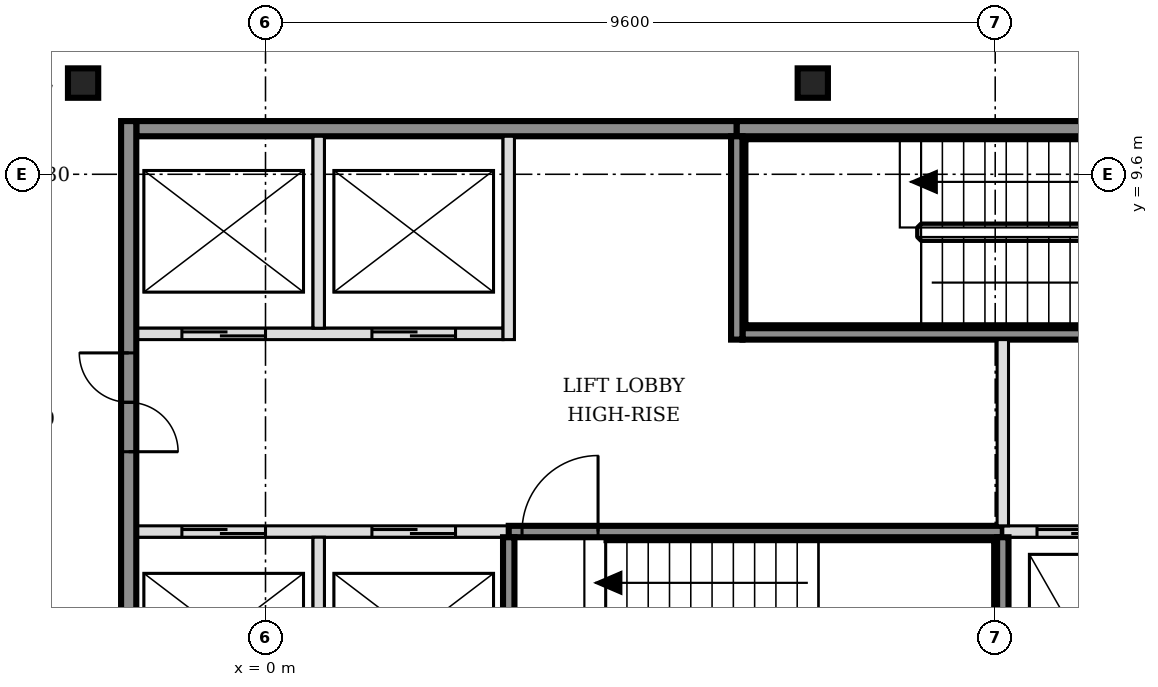
"""IFC4 building model, lengths in metres.
Left out: names, types, materials, properties, quantities, classifications, styles, units other than length and angle.
Written with IfcOpenShell. Run it as: python <this file> out.ifc"""

import sys

from ifc_helpers import new_model, si_unit, direction, frame, frame_2d, origin, origin_2d, place, context, subcontext, project, spatial, rectangle, i_section, extrude, element, fill, save


model = new_model("IFC4")
c1 = context("Model", 3, precision=1e-05, world=origin(), true_north=direction((0.0, 1.0)))
c2 = subcontext(c1, "Body", "Model", "MODEL_VIEW")
j1 = project(units=[si_unit("LENGTHUNIT", "METRE"), si_unit("PLANEANGLEUNIT", "RADIAN")], contexts=[c1])
p1 = place(None, origin())
s1 = spatial("IfcSite", under=j1, at=p1, CompositionType="ELEMENT")
p2 = place(p1, origin())
s2 = spatial("IfcBuilding", under=s1, at=p2, CompositionType="ELEMENT")
p3 = place(p2, frame((0.0, 0.0, 267.0)))
s3 = spatial("IfcBuildingStorey", under=s2, at=p3, CompositionType="ELEMENT", Elevation=267.0)
for number, where, z_axis, x_axis in (
    (1, (-2.4, 10.8, -0.15), (0.0, 0.0, 1.0), (1.0, 0.0, 0.0)),
    (2, (7.2, 10.8, -0.15), (0.0, 0.0, 1.0), (1.0, 0.0, 0.0)),
):
    element("IfcColumn", number, at=place(p3, frame(where, z_axis=z_axis, x_axis=x_axis)), inside=s3, PredefinedType="COLUMN", context=c2, shape_type="SweptSolid", body=[
        extrude(i_section(OverallWidth=0.398, OverallDepth=0.387, WebThickness=0.021, FlangeThickness=0.033, FilletRadius=0.015, at=origin_2d()), origin(), (0.0, 0.0, 1.0), 3.6),
    ])
p4 = place(p3, frame((-1.7, 4.9, 0.0), z_axis=(0.0, 0.0, 1.0), x_axis=(1.0, 0.0, 0.0)))
e3 = element("IfcWall", 3, at=p4, inside=s3, PredefinedType="SOLIDWALL", context=c2, shape_type="SweptSolid", body=[
    extrude(rectangle(XDim=4.9, YDim=0.15, at=frame_2d((2.45, 0.0))), origin(), (0.0, 0.0, 1.0), 3.45),
])
p5 = place(p4, frame((0.6, 0.0, 0.0)))
e4 = element("IfcOpeningElement", 4, at=p5, cuts=e3, PredefinedType="OPENING", context=c2, shape_type="SweptSolid", body=[
    extrude(rectangle(XDim=1.1, YDim=2.1, at=frame_2d((0.55, 1.05))), frame((0.0, 0.085, 0.0), z_axis=(0.0, -1.0, 0.0), x_axis=(1.0, 0.0, 0.0)), (0.0, 0.0, 1.0), 0.17),
])
p6 = place(p4, frame((3.1, 0.0, 0.0)))
e5 = element("IfcOpeningElement", 5, at=p6, cuts=e3, PredefinedType="OPENING", context=c2, shape_type="SweptSolid", body=[
    extrude(rectangle(XDim=1.1, YDim=2.1, at=frame_2d((0.55, 1.05))), frame((0.0, 0.085, 0.0), z_axis=(0.0, -1.0, 0.0), x_axis=(1.0, 0.0, 0.0)), (0.0, 0.0, 1.0), 0.17),
])
p7 = place(p3, frame((3.2, 4.9, 0.0), z_axis=(0.0, 0.0, 1.0), x_axis=(1.0, 0.0, 0.0)))
e6 = element("IfcWall", 6, at=p7, inside=s3, PredefinedType="SOLIDWALL", context=c2, shape_type="SweptSolid", body=[
    extrude(rectangle(XDim=6.5, YDim=0.15, at=frame_2d((3.25, 0.0))), origin(), (0.0, 0.0, 1.0), 3.45),
])
p8 = place(p7, frame((0.175, 0.0, 0.0)))
e7 = element("IfcOpeningElement", 7, at=p8, cuts=e6, PredefinedType="OPENING", context=c2, shape_type="SweptSolid", body=[
    extrude(rectangle(XDim=1.0, YDim=2.1, at=frame_2d((0.5, 1.05))), frame((0.0, 0.085, 0.0), z_axis=(0.0, -1.0, 0.0), x_axis=(1.0, 0.0, 0.0)), (0.0, 0.0, 1.0), 0.17),
])
p9 = place(p3, frame((9.7, 4.9, 0.0), z_axis=(0.0, 0.0, 1.0), x_axis=(1.0, 0.0, 0.0)))
e8 = element("IfcWall", 8, at=p9, inside=s3, PredefinedType="SOLIDWALL", context=c2, shape_type="SweptSolid", body=[
    extrude(rectangle(XDim=6.4, YDim=0.15, at=frame_2d((3.2, 0.0))), origin(), (0.0, 0.0, 1.0), 3.45),
])
p10 = place(p9, frame((0.45, 0.0, 0.0)))
e9 = element("IfcOpeningElement", 9, at=p10, cuts=e8, PredefinedType="OPENING", context=c2, shape_type="SweptSolid", body=[
    extrude(rectangle(XDim=1.0, YDim=2.1, at=frame_2d((0.5, 1.05))), frame((0.0, 0.085, 0.0), z_axis=(0.0, -1.0, 0.0), x_axis=(1.0, 0.0, 0.0)), (0.0, 0.0, 1.0), 0.17),
])
p11 = place(p9, frame((2.35, 0.0, 0.0)))
e10 = element("IfcOpeningElement", 10, at=p11, cuts=e8, PredefinedType="OPENING", context=c2, shape_type="SweptSolid", body=[
    extrude(rectangle(XDim=1.0, YDim=2.1, at=frame_2d((0.5, 1.05))), frame((0.0, 0.085, 0.0), z_axis=(0.0, -1.0, 0.0), x_axis=(1.0, 0.0, 0.0)), (0.0, 0.0, 1.0), 0.17),
])
p12 = place(p9, frame((4.7, 0.0, 0.0)))
e11 = element("IfcOpeningElement", 11, at=p12, cuts=e8, PredefinedType="OPENING", context=c2, shape_type="SweptSolid", body=[
    extrude(rectangle(XDim=0.9, YDim=2.1, at=frame_2d((0.45, 1.05))), frame((0.0, 0.085, 0.0), z_axis=(0.0, -1.0, 0.0), x_axis=(1.0, 0.0, 0.0)), (0.0, 0.0, 1.0), 0.17),
])
p13 = place(p3, frame((-1.7, 7.5, 0.0), z_axis=(0.0, 0.0, 1.0), x_axis=(1.0, 0.0, 0.0)))
e12 = element("IfcWall", 12, at=p13, inside=s3, PredefinedType="SOLIDWALL", context=c2, shape_type="SweptSolid", body=[
    extrude(rectangle(XDim=4.825, YDim=0.15, at=frame_2d((2.413, 0.0))), origin(), (0.0, 0.0, 1.0), 3.45),
])
p14 = place(p13, frame((0.6, 0.0, 0.0)))
e13 = element("IfcOpeningElement", 13, at=p14, cuts=e12, PredefinedType="OPENING", context=c2, shape_type="SweptSolid", body=[
    extrude(rectangle(XDim=1.1, YDim=2.1, at=frame_2d((0.55, 1.05))), frame((0.0, 0.085, 0.0), z_axis=(0.0, -1.0, 0.0), x_axis=(1.0, 0.0, 0.0)), (0.0, 0.0, 1.0), 0.17),
])
p15 = place(p13, frame((3.1, 0.0, 0.0)))
e14 = element("IfcOpeningElement", 14, at=p15, cuts=e12, PredefinedType="OPENING", context=c2, shape_type="SweptSolid", body=[
    extrude(rectangle(XDim=1.1, YDim=2.1, at=frame_2d((0.55, 1.05))), frame((0.0, 0.085, 0.0), z_axis=(0.0, -1.0, 0.0), x_axis=(1.0, 0.0, 0.0)), (0.0, 0.0, 1.0), 0.17),
])
p16 = place(p3, frame((6.275, 7.5, 0.0), z_axis=(0.0, 0.0, 1.0), x_axis=(1.0, 0.0, 0.0)))
e15 = element("IfcWall", 15, at=p16, inside=s3, PredefinedType="SOLIDWALL", context=c2, shape_type="SweptSolid", body=[
    extrude(rectangle(XDim=6.425, YDim=0.15, at=frame_2d((3.212, 0.0))), origin(), (0.0, 0.0, 1.0), 3.45),
])
p17 = place(p16, frame((5.225, 0.0, 0.0)))
e16 = element("IfcOpeningElement", 16, at=p17, cuts=e15, PredefinedType="OPENING", context=c2, shape_type="SweptSolid", body=[
    extrude(rectangle(XDim=1.0, YDim=2.1, at=frame_2d((0.5, 1.05))), frame((0.0, 0.085, 0.0), z_axis=(0.0, -1.0, 0.0), x_axis=(1.0, 0.0, 0.0)), (0.0, 0.0, 1.0), 0.17),
])
p18 = place(p3, frame((-1.7, 10.2, 0.0), z_axis=(0.0, 0.0, 1.0), x_axis=(1.0, 0.0, 0.0)))
e17 = element("IfcWall", 17, at=p18, inside=s3, PredefinedType="SOLIDWALL", context=c2, shape_type="SweptSolid", body=[
    extrude(rectangle(XDim=7.9, YDim=0.2, at=frame_2d((3.95, 0.0))), origin(), (0.0, 0.0, 1.0), 3.45),
])
p19 = place(p3, frame((6.2, 10.2, 0.0), z_axis=(0.0, 0.0, 1.0), x_axis=(1.0, 0.0, 0.0)))
e18 = element("IfcWall", 18, at=p19, inside=s3, PredefinedType="SOLIDWALL", context=c2, shape_type="SweptSolid", body=[
    extrude(rectangle(XDim=6.5, YDim=0.2, at=frame_2d((3.25, 0.0))), origin(), (0.0, 0.0, 1.0), 3.45),
])
p20 = place(p3, frame((-1.8, -5.5, 0.0), z_axis=(0.0, 0.0, 1.0), x_axis=(0.0, 1.0, 0.0)))
e19 = element("IfcWall", 19, at=p20, inside=s3, PredefinedType="SOLIDWALL", context=c2, shape_type="SweptSolid", body=[
    extrude(rectangle(XDim=15.8, YDim=0.2, at=frame_2d((7.9, 0.0))), origin(), (0.0, 0.0, 1.0), 3.45),
])
p21 = place(p20, frame((3.05, 0.0, 0.0)))
e20 = element("IfcOpeningElement", 20, at=p21, cuts=e19, PredefinedType="OPENING", context=c2, shape_type="SweptSolid", body=[
    extrude(rectangle(XDim=1.3, YDim=2.1, at=frame_2d((0.65, 1.05))), frame((0.0, 0.11, 0.0), z_axis=(0.0, -1.0, 0.0), x_axis=(1.0, 0.0, 0.0)), (0.0, 0.0, 1.0), 0.22),
])
p22 = place(p20, frame((11.45, 0.0, 0.0)))
e21 = element("IfcOpeningElement", 21, at=p22, cuts=e19, PredefinedType="OPENING", context=c2, shape_type="SweptSolid", body=[
    extrude(rectangle(XDim=1.3, YDim=2.1, at=frame_2d((0.65, 1.05))), frame((0.0, 0.11, 0.0), z_axis=(0.0, -1.0, 0.0), x_axis=(1.0, 0.0, 0.0)), (0.0, 0.0, 1.0), 0.22),
])
p23 = place(p3, frame((0.7, 2.275, 0.0), z_axis=(0.0, 0.0, 1.0), x_axis=(0.0, 1.0, 0.0)))
e22 = element("IfcWall", 22, at=p23, inside=s3, PredefinedType="SOLIDWALL", context=c2, shape_type="SweptSolid", body=[
    extrude(rectangle(XDim=2.55, YDim=0.15, at=frame_2d((1.275, 0.0))), origin(), (0.0, 0.0, 1.0), 3.45),
])
p24 = place(p3, frame((0.7, 7.575, 0.0), z_axis=(0.0, 0.0, 1.0), x_axis=(0.0, 1.0, 0.0)))
e23 = element("IfcWall", 23, at=p24, inside=s3, PredefinedType="SOLIDWALL", context=c2, shape_type="SweptSolid", body=[
    extrude(rectangle(XDim=2.525, YDim=0.15, at=frame_2d((1.263, 0.0))), origin(), (0.0, 0.0, 1.0), 3.45),
])
p25 = place(p3, frame((3.2, 2.275, 0.0), z_axis=(0.0, 0.0, 1.0), x_axis=(0.0, 1.0, 0.0)))
e24 = element("IfcWall", 24, at=p25, inside=s3, PredefinedType="SOLIDWALL", context=c2, shape_type="SweptSolid", body=[
    extrude(rectangle(XDim=2.55, YDim=0.15, at=frame_2d((1.275, 0.0))), origin(), (0.0, 0.0, 1.0), 3.45),
])
for number, where, z_axis, x_axis in (
    (25, (3.2, 7.425, 0.0), (0.0, 0.0, 1.0), (0.0, 1.0, 0.0)),
    (26, (6.2, 7.425, 0.0), (0.0, 0.0, 1.0), (0.0, 1.0, 0.0)),
):
    element("IfcWall", number, at=place(p3, frame(where, z_axis=z_axis, x_axis=x_axis)), inside=s3, PredefinedType="SOLIDWALL", context=c2, shape_type="SweptSolid", body=[
        extrude(rectangle(XDim=2.675, YDim=0.15, at=frame_2d((1.337, 0.0))), origin(), (0.0, 0.0, 1.0), 3.45),
    ])
p26 = place(p3, frame((9.7, 2.275, 0.0), z_axis=(0.0, 0.0, 1.0), x_axis=(0.0, 1.0, 0.0)))
e27 = element("IfcWall", 27, at=p26, inside=s3, PredefinedType="SOLIDWALL", context=c2, shape_type="SweptSolid", body=[
    extrude(rectangle(XDim=2.55, YDim=0.15, at=frame_2d((1.275, 0.0))), origin(), (0.0, 0.0, 1.0), 3.45),
])
p27 = place(p3, frame((9.7, 4.975, 0.0), z_axis=(0.0, 0.0, 1.0), x_axis=(0.0, 1.0, 0.0)))
e28 = element("IfcWall", 28, at=p27, inside=s3, PredefinedType="SOLIDWALL", context=c2, shape_type="SweptSolid", body=[
    extrude(rectangle(XDim=2.45, YDim=0.15, at=frame_2d((1.225, 0.0))), origin(), (0.0, 0.0, 1.0), 3.45),
])
p28 = place(p5, origin())
e29 = element("IfcDoor", 29, at=p28, inside=s3, OperationType="DOUBLE_DOOR_SLIDING", PredefinedType="DOOR", context=c2, shape_type="SweptSolid", body=[
    extrude(rectangle(XDim=1.1, YDim=2.1, at=frame_2d((0.55, 1.05))), frame((0.0, 0.025, 0.0), z_axis=(0.0, -1.0, 0.0), x_axis=(1.0, 0.0, 0.0)), (0.0, 0.0, 1.0), 0.05),
])
fill(e4, e29)
p29 = place(p6, origin())
e30 = element("IfcDoor", 30, at=p29, inside=s3, OperationType="DOUBLE_DOOR_SLIDING", PredefinedType="DOOR", context=c2, shape_type="SweptSolid", body=[
    extrude(rectangle(XDim=1.1, YDim=2.1, at=frame_2d((0.55, 1.05))), frame((0.0, 0.025, 0.0), z_axis=(0.0, -1.0, 0.0), x_axis=(1.0, 0.0, 0.0)), (0.0, 0.0, 1.0), 0.05),
])
fill(e5, e30)
p30 = place(p14, origin())
e31 = element("IfcDoor", 31, at=p30, inside=s3, OperationType="DOUBLE_DOOR_SLIDING", PredefinedType="DOOR", context=c2, shape_type="SweptSolid", body=[
    extrude(rectangle(XDim=1.1, YDim=2.1, at=frame_2d((0.55, 1.05))), frame((0.0, 0.025, 0.0), z_axis=(0.0, -1.0, 0.0), x_axis=(1.0, 0.0, 0.0)), (0.0, 0.0, 1.0), 0.05),
])
fill(e13, e31)
p31 = place(p15, origin())
e32 = element("IfcDoor", 32, at=p31, inside=s3, OperationType="DOUBLE_DOOR_SLIDING", PredefinedType="DOOR", context=c2, shape_type="SweptSolid", body=[
    extrude(rectangle(XDim=1.1, YDim=2.1, at=frame_2d((0.55, 1.05))), frame((0.0, 0.025, 0.0), z_axis=(0.0, -1.0, 0.0), x_axis=(1.0, 0.0, 0.0)), (0.0, 0.0, 1.0), 0.05),
])
fill(e14, e32)
p32 = place(p10, origin())
e33 = element("IfcDoor", 33, at=p32, inside=s3, OperationType="DOUBLE_DOOR_SLIDING", PredefinedType="DOOR", context=c2, shape_type="SweptSolid", body=[
    extrude(rectangle(XDim=1.0, YDim=2.1, at=frame_2d((0.5, 1.05))), frame((0.0, 0.025, 0.0), z_axis=(0.0, -1.0, 0.0), x_axis=(1.0, 0.0, 0.0)), (0.0, 0.0, 1.0), 0.05),
])
fill(e9, e33)
p33 = place(p8, origin())
e34 = element("IfcDoor", 34, at=p33, inside=s3, OperationType="SINGLE_SWING_RIGHT", PredefinedType="DOOR", context=c2, shape_type="SweptSolid", body=[
    extrude(rectangle(XDim=1.0, YDim=2.1, at=frame_2d((0.5, 1.05))), frame((0.0, 0.025, 0.0), z_axis=(0.0, -1.0, 0.0), x_axis=(1.0, 0.0, 0.0)), (0.0, 0.0, 1.0), 0.05),
])
fill(e7, e34)
p34 = place(p22, origin())
e35 = element("IfcDoor", 35, at=p34, inside=s3, OperationType="DOUBLE_DOOR_SINGLE_SWING", PredefinedType="DOOR", context=c2, shape_type="SweptSolid", body=[
    extrude(rectangle(XDim=1.3, YDim=2.1, at=frame_2d((0.65, 1.05))), frame((0.0, 0.025, 0.0), z_axis=(0.0, -1.0, 0.0), x_axis=(1.0, 0.0, 0.0)), (0.0, 0.0, 1.0), 0.05),
])
fill(e21, e35)
save(model, sys.argv[1])
